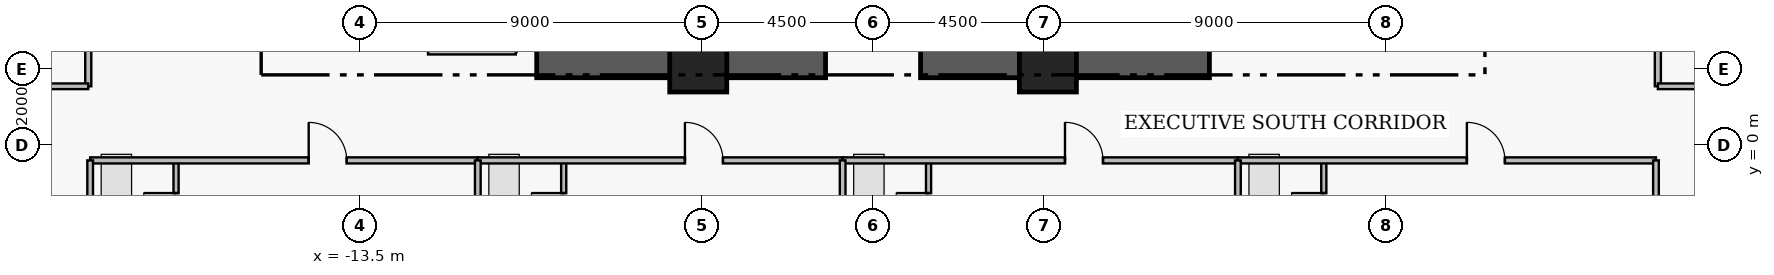
"""IFC4 building model, lengths in metres.
Left out: names, types, materials, properties, quantities, classifications, styles, units other than length and angle.
Written with IfcOpenShell. Run it as: python <this file> out.ifc"""

import sys

from ifc_helpers import new_model, si_unit, direction, frame, frame_2d, origin, origin_2d, place, context, subcontext, project, spatial, rectangle, extrude, element, fill, save


model = new_model("IFC4")
c1 = context("Model", 3, precision=1e-05, world=origin(), true_north=direction((0.0, 1.0)))
c2 = subcontext(c1, "Body", "Model", "MODEL_VIEW")
j1 = project(units=[si_unit("LENGTHUNIT", "METRE"), si_unit("PLANEANGLEUNIT", "RADIAN")], contexts=[c1])
p1 = place(None, origin())
s1 = spatial("IfcSite", under=j1, at=p1, CompositionType="ELEMENT")
p2 = place(p1, origin())
s2 = spatial("IfcBuilding", under=s1, at=p2, CompositionType="ELEMENT")
p3 = place(p2, frame((0.0, 0.0, 143.1)))
s3 = spatial("IfcBuildingStorey", under=s2, at=p3, CompositionType="ELEMENT", Elevation=143.1)
for number, where, z_axis, x_axis in (
    (1, (-8.85, 2.15, 0.0), (0.0, 0.0, 1.0), (1.0, 0.0, 0.0)),
    (2, (1.25, 2.15, 0.0), (0.0, 0.0, 1.0), (1.0, 0.0, 0.0)),
):
    element("IfcWall", number, at=place(p3, frame(where, z_axis=z_axis, x_axis=x_axis)), inside=s3, PredefinedType="SHEAR", context=c2, shape_type="SweptSolid", body=[
        extrude(rectangle(XDim=7.6, YDim=0.75, at=frame_2d((3.8, 0.0))), origin(), (0.0, 0.0, 1.0), 3.43),
    ])
for number, where, z_axis, x_axis in (
    (3, (-4.6, 2.15, 0.0), (0.0, 0.0, 1.0), (1.0, 0.0, 0.0)),
    (4, (4.6, 2.15, 0.0), (0.0, 0.0, 1.0), (1.0, 0.0, 0.0)),
):
    element("IfcColumn", number, at=place(p3, frame(where, z_axis=z_axis, x_axis=x_axis)), inside=s3, PredefinedType="COLUMN", context=c2, shape_type="SweptSolid", body=[
        extrude(rectangle(XDim=1.5, YDim=1.5, at=origin_2d()), origin(), (0.0, 0.0, 1.0), 3.65),
    ])
p4 = place(p3, frame((-18.34, -2.76, 0.0), z_axis=(0.0, 0.0, 1.0), x_axis=(0.0, 1.0, 0.0)))
e5 = element("IfcWall", 5, at=p4, inside=s3, PredefinedType="PLUMBINGWALL", context=c2, shape_type="SweptSolid", body=[
    extrude(rectangle(XDim=2.36, YDim=0.135, at=frame_2d((1.18, 0.0))), origin(), (0.0, 0.0, 1.0), 3.43),
])
p5 = place(p4, frame((0.65, 0.0, 0.0)))
e6 = element("IfcOpeningElement", 6, at=p5, cuts=e5, PredefinedType="OPENING", context=c2, shape_type="SweptSolid", body=[
    extrude(rectangle(XDim=0.85, YDim=2.1, at=frame_2d((0.425, 1.05))), frame((0.0, 0.077, 0.0), z_axis=(0.0, -1.0, 0.0), x_axis=(1.0, 0.0, 0.0)), (0.0, 0.0, 1.0), 0.155),
])
p6 = place(p3, frame((-20.6, -0.4, 0.0), z_axis=(0.0, 0.0, 1.0), x_axis=(1.0, 0.0, 0.0)))
e7 = element("IfcWall", 7, at=p6, inside=s3, PredefinedType="PARTITIONING", context=c2, shape_type="SweptSolid", body=[
    extrude(rectangle(XDim=10.2, YDim=0.16, at=frame_2d((5.1, 0.0))), origin(), (0.0, 0.0, 1.0), 3.43),
])
p7 = place(p6, frame((5.75, 0.0, 0.0)))
e8 = element("IfcOpeningElement", 8, at=p7, cuts=e7, PredefinedType="OPENING", context=c2, shape_type="SweptSolid", body=[
    extrude(rectangle(XDim=1.0, YDim=2.15, at=frame_2d((0.5, 1.075))), frame((0.0, 0.09, 0.0), z_axis=(0.0, -1.0, 0.0), x_axis=(1.0, 0.0, 0.0)), (0.0, 0.0, 1.0), 0.18),
])
p8 = place(p3, frame((-8.14, -2.76, 0.0), z_axis=(0.0, 0.0, 1.0), x_axis=(0.0, 1.0, 0.0)))
e9 = element("IfcWall", 9, at=p8, inside=s3, PredefinedType="PLUMBINGWALL", context=c2, shape_type="SweptSolid", body=[
    extrude(rectangle(XDim=2.36, YDim=0.135, at=frame_2d((1.18, 0.0))), origin(), (0.0, 0.0, 1.0), 3.43),
])
p9 = place(p8, frame((0.65, 0.0, 0.0)))
e10 = element("IfcOpeningElement", 10, at=p9, cuts=e9, PredefinedType="OPENING", context=c2, shape_type="SweptSolid", body=[
    extrude(rectangle(XDim=0.85, YDim=2.1, at=frame_2d((0.425, 1.05))), frame((0.0, 0.077, 0.0), z_axis=(0.0, -1.0, 0.0), x_axis=(1.0, 0.0, 0.0)), (0.0, 0.0, 1.0), 0.155),
])
p10 = place(p3, frame((-10.4, -0.4, 0.0), z_axis=(0.0, 0.0, 1.0), x_axis=(1.0, 0.0, 0.0)))
e11 = element("IfcWall", 11, at=p10, inside=s3, PredefinedType="PARTITIONING", context=c2, shape_type="SweptSolid", body=[
    extrude(rectangle(XDim=9.6, YDim=0.16, at=frame_2d((4.8, 0.0))), origin(), (0.0, 0.0, 1.0), 3.43),
])
p11 = place(p10, frame((5.45, 0.0, 0.0)))
e12 = element("IfcOpeningElement", 12, at=p11, cuts=e11, PredefinedType="OPENING", context=c2, shape_type="SweptSolid", body=[
    extrude(rectangle(XDim=1.0, YDim=2.15, at=frame_2d((0.5, 1.075))), frame((0.0, 0.09, 0.0), z_axis=(0.0, -1.0, 0.0), x_axis=(1.0, 0.0, 0.0)), (0.0, 0.0, 1.0), 0.18),
])
p12 = place(p3, frame((1.46, -2.76, 0.0), z_axis=(0.0, 0.0, 1.0), x_axis=(0.0, 1.0, 0.0)))
e13 = element("IfcWall", 13, at=p12, inside=s3, PredefinedType="PLUMBINGWALL", context=c2, shape_type="SweptSolid", body=[
    extrude(rectangle(XDim=2.36, YDim=0.135, at=frame_2d((1.18, 0.0))), origin(), (0.0, 0.0, 1.0), 3.43),
])
p13 = place(p12, frame((0.65, 0.0, 0.0)))
e14 = element("IfcOpeningElement", 14, at=p13, cuts=e13, PredefinedType="OPENING", context=c2, shape_type="SweptSolid", body=[
    extrude(rectangle(XDim=0.85, YDim=2.1, at=frame_2d((0.425, 1.05))), frame((0.0, 0.077, 0.0), z_axis=(0.0, -1.0, 0.0), x_axis=(1.0, 0.0, 0.0)), (0.0, 0.0, 1.0), 0.155),
])
p14 = place(p3, frame((-0.8, -0.4, 0.0), z_axis=(0.0, 0.0, 1.0), x_axis=(1.0, 0.0, 0.0)))
e15 = element("IfcWall", 15, at=p14, inside=s3, PredefinedType="PARTITIONING", context=c2, shape_type="SweptSolid", body=[
    extrude(rectangle(XDim=10.4, YDim=0.16, at=frame_2d((5.2, 0.0))), origin(), (0.0, 0.0, 1.0), 3.43),
])
p15 = place(p14, frame((5.85, 0.0, 0.0)))
e16 = element("IfcOpeningElement", 16, at=p15, cuts=e15, PredefinedType="OPENING", context=c2, shape_type="SweptSolid", body=[
    extrude(rectangle(XDim=1.0, YDim=2.15, at=frame_2d((0.5, 1.075))), frame((0.0, 0.09, 0.0), z_axis=(0.0, -1.0, 0.0), x_axis=(1.0, 0.0, 0.0)), (0.0, 0.0, 1.0), 0.18),
])
p16 = place(p3, frame((11.86, -2.76, 0.0), z_axis=(0.0, 0.0, 1.0), x_axis=(0.0, 1.0, 0.0)))
e17 = element("IfcWall", 17, at=p16, inside=s3, PredefinedType="PLUMBINGWALL", context=c2, shape_type="SweptSolid", body=[
    extrude(rectangle(XDim=2.36, YDim=0.135, at=frame_2d((1.18, 0.0))), origin(), (0.0, 0.0, 1.0), 3.43),
])
p17 = place(p16, frame((0.65, 0.0, 0.0)))
e18 = element("IfcOpeningElement", 18, at=p17, cuts=e17, PredefinedType="OPENING", context=c2, shape_type="SweptSolid", body=[
    extrude(rectangle(XDim=0.85, YDim=2.1, at=frame_2d((0.425, 1.05))), frame((0.0, 0.077, 0.0), z_axis=(0.0, -1.0, 0.0), x_axis=(1.0, 0.0, 0.0)), (0.0, 0.0, 1.0), 0.155),
])
p18 = place(p3, frame((9.6, -0.4, 0.0), z_axis=(0.0, 0.0, 1.0), x_axis=(1.0, 0.0, 0.0)))
e19 = element("IfcWall", 19, at=p18, inside=s3, PredefinedType="PARTITIONING", context=c2, shape_type="SweptSolid", body=[
    extrude(rectangle(XDim=11.0, YDim=0.16, at=frame_2d((5.5, 0.0))), origin(), (0.0, 0.0, 1.0), 3.43),
])
p19 = place(p18, frame((6.025, 0.0, 0.0)))
e20 = element("IfcOpeningElement", 20, at=p19, cuts=e19, PredefinedType="OPENING", context=c2, shape_type="SweptSolid", body=[
    extrude(rectangle(XDim=1.0, YDim=2.15, at=frame_2d((0.5, 1.075))), frame((0.0, 0.09, 0.0), z_axis=(0.0, -1.0, 0.0), x_axis=(1.0, 0.0, 0.0)), (0.0, 0.0, 1.0), 0.18),
])
p20 = place(p3, frame((20.65, 1.55, 0.0), z_axis=(0.0, 0.0, 1.0), x_axis=(0.0, 1.0, 0.0)))
e21 = element("IfcWall", 21, at=p20, inside=s3, PredefinedType="PARTITIONING", context=c2, shape_type="SweptSolid", body=[
    extrude(rectangle(XDim=5.2, YDim=0.16, at=frame_2d((2.6, 0.0))), origin(), (0.0, 0.0, 1.0), 3.43),
])
p21 = place(p20, frame((2.14, 0.0, 0.0)))
e22 = element("IfcOpeningElement", 22, at=p21, cuts=e21, PredefinedType="OPENING", context=c2, shape_type="SweptSolid", body=[
    extrude(rectangle(XDim=0.92, YDim=2.12, at=frame_2d((0.46, 1.06))), frame((0.0, 0.09, 0.0), z_axis=(0.0, -1.0, 0.0), x_axis=(1.0, 0.0, 0.0)), (0.0, 0.0, 1.0), 0.18),
])
p22 = place(p3, frame((-20.65, 1.55, 0.0), z_axis=(0.0, 0.0, 1.0), x_axis=(0.0, 1.0, 0.0)))
e23 = element("IfcWall", 23, at=p22, inside=s3, PredefinedType="PARTITIONING", context=c2, shape_type="SweptSolid", body=[
    extrude(rectangle(XDim=13.3, YDim=0.16, at=frame_2d((6.65, 0.0))), origin(), (0.0, 0.0, 1.0), 3.43),
])
p23 = place(p22, frame((6.175, 0.0, 0.0)))
e24 = element("IfcOpeningElement", 24, at=p23, cuts=e23, PredefinedType="OPENING", context=c2, shape_type="SweptSolid", body=[
    extrude(rectangle(XDim=0.95, YDim=2.15, at=frame_2d((0.475, 1.075))), frame((0.0, 0.09, 0.0), z_axis=(0.0, -1.0, 0.0), x_axis=(1.0, 0.0, 0.0)), (0.0, 0.0, 1.0), 0.18),
])
p24 = place(p3, frame((-11.71, 2.47, 0.0), z_axis=(0.0, 0.0, 1.0), x_axis=(1.0, 0.0, 0.0)))
e25 = element("IfcWall", 25, at=p24, inside=s3, PredefinedType="PARTITIONING", context=c2, shape_type="SweptSolid", body=[
    extrude(rectangle(XDim=2.31, YDim=0.165, at=frame_2d((1.155, 0.0))), origin(), (0.0, 0.0, 1.0), 2.03),
])
p25 = place(p3, frame((-20.6, -11.9, 0.0), z_axis=(0.0, 0.0, 1.0), x_axis=(0.0, 1.0, 0.0)))
e26 = element("IfcWall", 26, at=p25, inside=s3, PredefinedType="PARTITIONING", context=c2, shape_type="SweptSolid", body=[
    extrude(rectangle(XDim=11.5, YDim=0.15, at=frame_2d((5.75, 0.0))), origin(), (0.0, 0.0, 1.0), 3.43),
])
for number, where, z_axis, x_axis in (
    (27, (-10.4, -15.32, 0.0), (0.0, 0.0, 1.0), (0.0, 1.0, 0.0)),
    (28, (-0.8, -15.32, 0.0), (0.0, 0.0, 1.0), (0.0, 1.0, 0.0)),
    (29, (9.6, -15.32, 0.0), (0.0, 0.0, 1.0), (0.0, 1.0, 0.0)),
):
    element("IfcWall", number, at=place(p3, frame(where, z_axis=z_axis, x_axis=x_axis)), inside=s3, PredefinedType="PARTITIONING", context=c2, shape_type="SweptSolid", body=[
        extrude(rectangle(XDim=14.92, YDim=0.15, at=frame_2d((7.46, 0.0))), origin(), (0.0, 0.0, 1.0), 3.43),
    ])
p26 = place(p3, frame((20.6, -11.9, 0.0), z_axis=(0.0, 0.0, 1.0), x_axis=(0.0, 1.0, 0.0)))
e30 = element("IfcWall", 30, at=p26, inside=s3, PredefinedType="PARTITIONING", context=c2, shape_type="SweptSolid", body=[
    extrude(rectangle(XDim=11.5, YDim=0.15, at=frame_2d((5.75, 0.0))), origin(), (0.0, 0.0, 1.0), 3.43),
])
for number, where, z_axis, x_axis in (
    (31, (20.65, 1.55, 0.0), (0.0, 0.0, 1.0), (1.0, 0.0, 0.0)),
    (32, (-23.867, 1.55, 0.0), (0.0, 0.0, 1.0), (1.0, 0.0, 0.0)),
):
    element("IfcWall", number, at=place(p3, frame(where, z_axis=z_axis, x_axis=x_axis)), inside=s3, PredefinedType="PARTITIONING", context=c2, shape_type="SweptSolid", body=[
        extrude(rectangle(XDim=3.217, YDim=0.15, at=frame_2d((1.608, 0.0))), origin(), (0.0, 0.0, 1.0), 3.43),
    ])
p27 = place(p5, origin())
e33 = element("IfcDoor", 33, at=p27, inside=s3, OperationType="SINGLE_SWING_RIGHT", PredefinedType="DOOR", context=c2, shape_type="SweptSolid", body=[
    extrude(rectangle(XDim=0.85, YDim=2.1, at=frame_2d((0.425, 1.05))), frame((0.0, 0.025, 0.0), z_axis=(0.0, -1.0, 0.0), x_axis=(1.0, 0.0, 0.0)), (0.0, 0.0, 1.0), 0.05),
])
fill(e6, e33)
p28 = place(p7, origin())
e34 = element("IfcDoor", 34, at=p28, inside=s3, OperationType="SINGLE_SWING_LEFT", PredefinedType="DOOR", context=c2, shape_type="SweptSolid", body=[
    extrude(rectangle(XDim=1.0, YDim=2.15, at=frame_2d((0.5, 1.075))), frame((0.0, 0.025, 0.0), z_axis=(0.0, -1.0, 0.0), x_axis=(1.0, 0.0, 0.0)), (0.0, 0.0, 1.0), 0.05),
])
fill(e8, e34)
p29 = place(p9, origin())
e35 = element("IfcDoor", 35, at=p29, inside=s3, OperationType="SINGLE_SWING_RIGHT", PredefinedType="DOOR", context=c2, shape_type="SweptSolid", body=[
    extrude(rectangle(XDim=0.85, YDim=2.1, at=frame_2d((0.425, 1.05))), frame((0.0, 0.025, 0.0), z_axis=(0.0, -1.0, 0.0), x_axis=(1.0, 0.0, 0.0)), (0.0, 0.0, 1.0), 0.05),
])
fill(e10, e35)
p30 = place(p11, origin())
e36 = element("IfcDoor", 36, at=p30, inside=s3, OperationType="SINGLE_SWING_LEFT", PredefinedType="DOOR", context=c2, shape_type="SweptSolid", body=[
    extrude(rectangle(XDim=1.0, YDim=2.15, at=frame_2d((0.5, 1.075))), frame((0.0, 0.025, 0.0), z_axis=(0.0, -1.0, 0.0), x_axis=(1.0, 0.0, 0.0)), (0.0, 0.0, 1.0), 0.05),
])
fill(e12, e36)
p31 = place(p13, origin())
e37 = element("IfcDoor", 37, at=p31, inside=s3, OperationType="SINGLE_SWING_RIGHT", PredefinedType="DOOR", context=c2, shape_type="SweptSolid", body=[
    extrude(rectangle(XDim=0.85, YDim=2.1, at=frame_2d((0.425, 1.05))), frame((0.0, 0.025, 0.0), z_axis=(0.0, -1.0, 0.0), x_axis=(1.0, 0.0, 0.0)), (0.0, 0.0, 1.0), 0.05),
])
fill(e14, e37)
p32 = place(p15, origin())
e38 = element("IfcDoor", 38, at=p32, inside=s3, OperationType="SINGLE_SWING_LEFT", PredefinedType="DOOR", context=c2, shape_type="SweptSolid", body=[
    extrude(rectangle(XDim=1.0, YDim=2.15, at=frame_2d((0.5, 1.075))), frame((0.0, 0.025, 0.0), z_axis=(0.0, -1.0, 0.0), x_axis=(1.0, 0.0, 0.0)), (0.0, 0.0, 1.0), 0.05),
])
fill(e16, e38)
p33 = place(p17, origin())
e39 = element("IfcDoor", 39, at=p33, inside=s3, OperationType="SINGLE_SWING_RIGHT", PredefinedType="DOOR", context=c2, shape_type="SweptSolid", body=[
    extrude(rectangle(XDim=0.85, YDim=2.1, at=frame_2d((0.425, 1.05))), frame((0.0, 0.025, 0.0), z_axis=(0.0, -1.0, 0.0), x_axis=(1.0, 0.0, 0.0)), (0.0, 0.0, 1.0), 0.05),
])
fill(e18, e39)
p34 = place(p19, origin())
e40 = element("IfcDoor", 40, at=p34, inside=s3, OperationType="SINGLE_SWING_LEFT", PredefinedType="DOOR", context=c2, shape_type="SweptSolid", body=[
    extrude(rectangle(XDim=1.0, YDim=2.15, at=frame_2d((0.5, 1.075))), frame((0.0, 0.025, 0.0), z_axis=(0.0, -1.0, 0.0), x_axis=(1.0, 0.0, 0.0)), (0.0, 0.0, 1.0), 0.05),
])
fill(e20, e40)
save(model, sys.argv[1])
